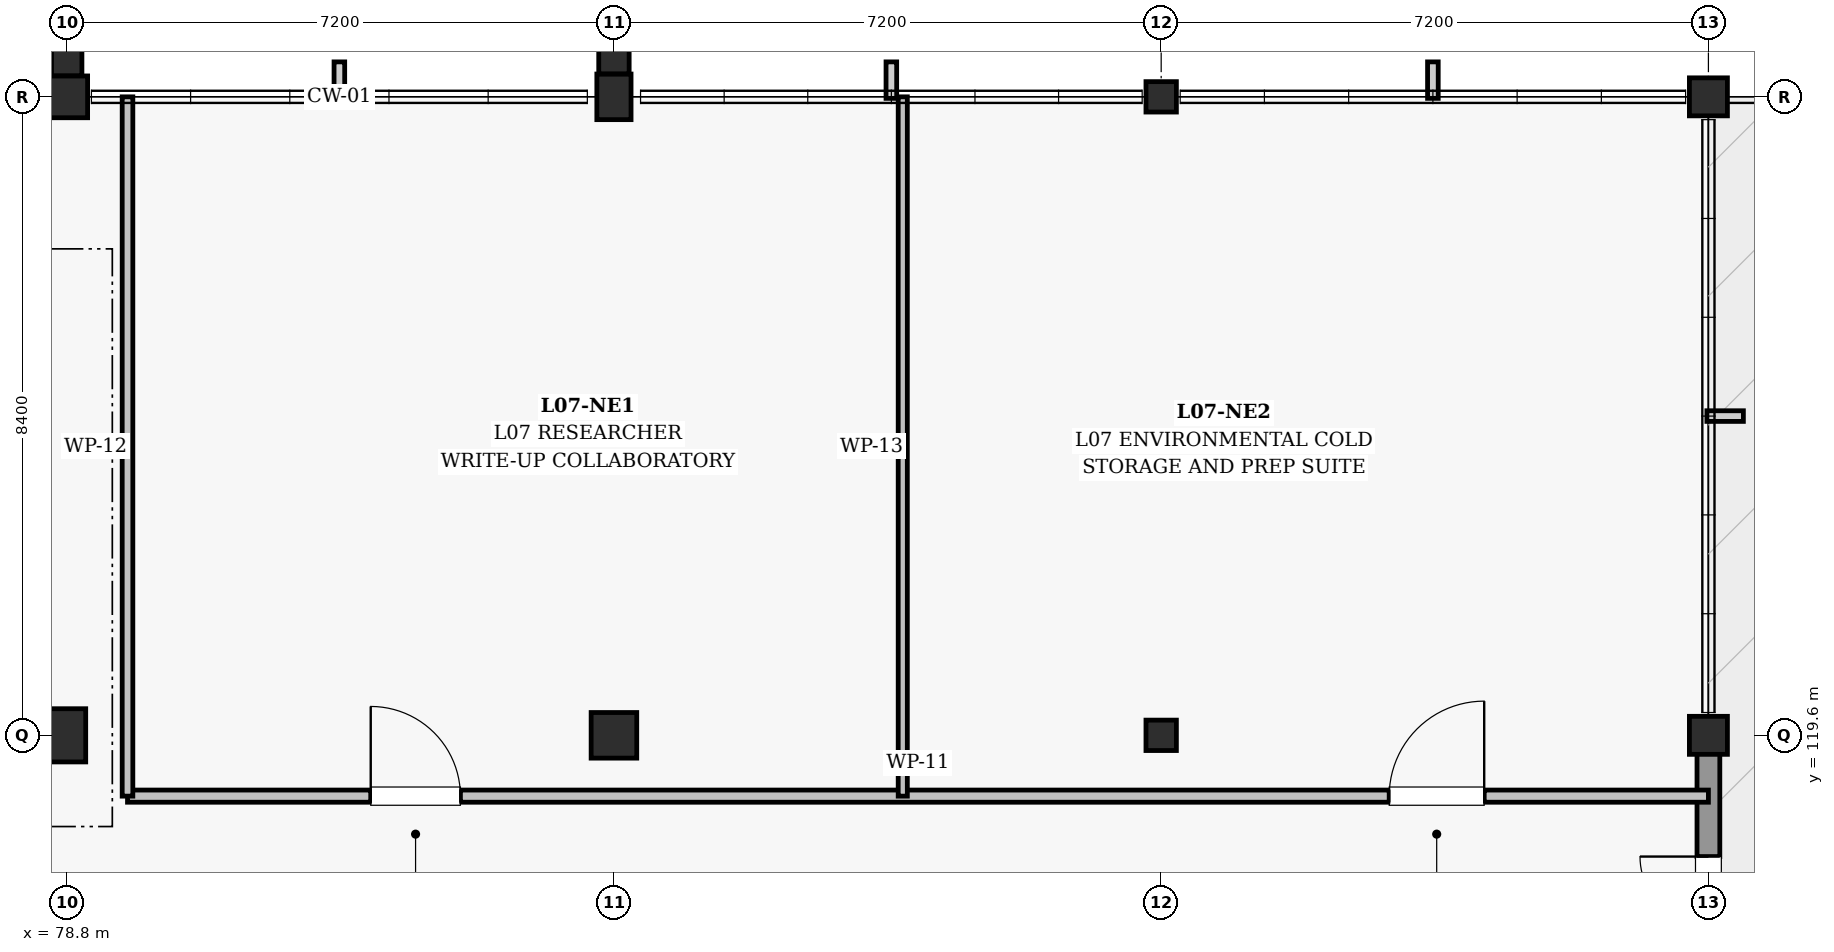
"""IFC4 building model, lengths in metres.
Left out: names, types, materials, properties, quantities, classifications, styles, units other than length and angle.
Written with IfcOpenShell. Run it as: python <this file> out.ifc"""

import sys

from ifc_helpers import new_model, si_unit, direction, frame, frame_2d, origin, origin_2d, place, context, subcontext, project, spatial, rectangle, extrude, element, fill, save


model = new_model("IFC4")
c1 = context("Model", 3, precision=1e-05, world=origin(), true_north=direction((0.0, 1.0)))
c2 = subcontext(c1, "Body", "Model", "MODEL_VIEW")
j1 = project(units=[si_unit("LENGTHUNIT", "METRE"), si_unit("PLANEANGLEUNIT", "RADIAN")], contexts=[c1])
p1 = place(None, origin())
s1 = spatial("IfcSite", under=j1, at=p1, CompositionType="ELEMENT")
p2 = place(p1, origin())
s2 = spatial("IfcBuilding", under=s1, at=p2, CompositionType="ELEMENT")
p3 = place(p2, frame((0.0, 0.0, 32.4)))
s3 = spatial("IfcBuildingStorey", under=s2, at=p3, CompositionType="ELEMENT", Elevation=32.4)
p4 = place(p3, frame((78.8, 119.6, 0.0), z_axis=(0.0, 0.0, 1.0), x_axis=(1.0, 0.0, 0.0)))
e1 = element("IfcColumn", 1, at=p4, inside=s3, PredefinedType="COLUMN", context=c2, shape_type="SweptSolid", body=[
    extrude(rectangle(XDim=0.5, YDim=0.7, at=origin_2d()), origin(), (0.0, 0.0, 1.0), 4.5),
])
p5 = place(p3, frame((78.8, 128.0, 0.0), z_axis=(0.0, 0.0, 1.0), x_axis=(1.0, 0.0, 0.0)))
e2 = element("IfcColumn", 2, at=p5, inside=s3, PredefinedType="COLUMN", context=c2, shape_type="SweptSolid", body=[
    extrude(rectangle(XDim=0.55, YDim=0.55, at=origin_2d()), origin(), (0.0, 0.0, 1.0), 4.5),
])
p6 = place(p3, frame((86.0, 119.6, 0.0), z_axis=(0.0, 0.0, 1.0), x_axis=(1.0, 0.0, 0.0)))
e3 = element("IfcColumn", 3, at=p6, inside=s3, PredefinedType="COLUMN", context=c2, shape_type="SweptSolid", body=[
    extrude(rectangle(XDim=0.6, YDim=0.6, at=origin_2d()), origin(), (0.0, 0.0, 1.0), 4.5),
])
p7 = place(p3, frame((86.0, 128.0, 0.0), z_axis=(0.0, 0.0, 1.0), x_axis=(1.0, 0.0, 0.0)))
e4 = element("IfcColumn", 4, at=p7, inside=s3, PredefinedType="COLUMN", context=c2, shape_type="SweptSolid", body=[
    extrude(rectangle(XDim=0.45, YDim=0.6, at=origin_2d()), origin(), (0.0, 0.0, 1.0), 4.5),
])
for number, where, z_axis, x_axis in (
    (5, (93.2, 119.6, 0.0), (0.0, 0.0, 1.0), (1.0, 0.0, 0.0)),
    (6, (93.2, 128.0, 0.0), (0.0, 0.0, 1.0), (1.0, 0.0, 0.0)),
):
    element("IfcColumn", number, at=place(p3, frame(where, z_axis=z_axis, x_axis=x_axis)), inside=s3, PredefinedType="COLUMN", context=c2, shape_type="SweptSolid", body=[
        extrude(rectangle(XDim=0.4, YDim=0.4, at=origin_2d()), origin(), (0.0, 0.0, 1.0), 4.5),
    ])
for number, where, z_axis, x_axis in (
    (7, (100.4, 119.6, 0.0), (0.0, 0.0, 1.0), (1.0, 0.0, 0.0)),
    (8, (100.4, 128.0, 0.0), (0.0, 0.0, 1.0), (1.0, 0.0, 0.0)),
):
    element("IfcColumn", number, at=place(p3, frame(where, z_axis=z_axis, x_axis=x_axis)), inside=s3, PredefinedType="COLUMN", context=c2, shape_type="SweptSolid", body=[
        extrude(rectangle(XDim=0.5, YDim=0.5, at=origin_2d()), origin(), (0.0, 0.0, 1.0), 4.5),
    ])
for number, where, z_axis, x_axis in (
    (9, (78.8, 128.578, 0.0), (0.0, 0.0, 1.0), (1.0, 0.0, 0.0)),
    (10, (86.0, 128.603, 0.0), (0.0, 0.0, 1.0), (1.0, 0.0, 0.0)),
):
    element("IfcColumn", number, at=place(p3, frame(where, z_axis=z_axis, x_axis=x_axis)), inside=s3, PredefinedType="PILASTER", context=c2, shape_type="SweptSolid", body=[
        extrude(rectangle(XDim=0.4, YDim=0.6, at=origin_2d()), origin(), (0.0, 0.0, 1.0), 4.5),
    ])
p8 = place(p3, frame((100.4, 111.405, 0.0), z_axis=(0.0, 0.0, 1.0), x_axis=(0.0, 1.0, 0.0)))
e11 = element("IfcWall", 11, at=p8, inside=s3, PredefinedType="SOLIDWALL", context=c2, shape_type="SweptSolid", body=[
    extrude(rectangle(XDim=7.965, YDim=0.3, at=frame_2d((3.982, 0.0))), origin(), (0.0, 0.0, 1.0), 3.355),
])
p9 = place(p8, frame((4.8, 0.0, 0.0)))
e12 = element("IfcOpeningElement", 12, at=p9, cuts=e11, PredefinedType="OPENING", context=c2, shape_type="SweptSolid", body=[
    extrude(rectangle(XDim=1.8, YDim=2.3, at=frame_2d((0.9, 1.15))), frame((0.0, 0.16, 0.0), z_axis=(0.0, -1.0, 0.0), x_axis=(1.0, 0.0, 0.0)), (0.0, 0.0, 1.0), 0.32),
])
p10 = place(p3, frame((79.6, 118.8, 0.0), z_axis=(0.0, 0.0, 1.0), x_axis=(1.0, 0.0, 0.0)))
e13 = element("IfcWall", 13, at=p10, inside=s3, PredefinedType="PARTITIONING", context=c2, shape_type="SweptSolid", body=[
    extrude(rectangle(XDim=20.8, YDim=0.16, at=frame_2d((10.4, 0.0))), origin(), (0.0, 0.0, 1.0), 3.31),
])
p11 = place(p10, frame((3.2, 0.0, 0.0)))
e14 = element("IfcOpeningElement", 14, at=p11, cuts=e13, PredefinedType="OPENING", context=c2, shape_type="SweptSolid", body=[
    extrude(rectangle(XDim=1.18, YDim=2.2, at=frame_2d((0.59, 1.1))), frame((0.0, 0.09, 0.0), z_axis=(0.0, -1.0, 0.0), x_axis=(1.0, 0.0, 0.0)), (0.0, 0.0, 1.0), 0.18),
])
p12 = place(p10, frame((16.6, 0.0, 0.0)))
e15 = element("IfcOpeningElement", 15, at=p12, cuts=e13, PredefinedType="OPENING", context=c2, shape_type="SweptSolid", body=[
    extrude(rectangle(XDim=1.25, YDim=2.2, at=frame_2d((0.625, 1.1))), frame((0.0, 0.09, 0.0), z_axis=(0.0, -1.0, 0.0), x_axis=(1.0, 0.0, 0.0)), (0.0, 0.0, 1.0), 0.18),
])
p13 = place(p3, frame((79.6, 118.8, 0.0), z_axis=(0.0, 0.0, 1.0), x_axis=(0.0, 1.0, 0.0)))
e16 = element("IfcWall", 16, at=p13, inside=s3, PredefinedType="PARTITIONING", context=c2, shape_type="SweptSolid", body=[
    extrude(rectangle(XDim=9.2, YDim=0.14, at=frame_2d((4.6, 0.0))), origin(), (0.0, 0.0, 1.0), 3.51),
])
p14 = place(p3, frame((89.8, 118.8, 0.0), z_axis=(0.0, 0.0, 1.0), x_axis=(0.0, 1.0, 0.0)))
e17 = element("IfcWall", 17, at=p14, inside=s3, PredefinedType="PARTITIONING", context=c2, shape_type="SweptSolid", body=[
    extrude(rectangle(XDim=9.2, YDim=0.12, at=frame_2d((4.6, 0.0))), origin(), (0.0, 0.0, 1.0), 3.41),
])
p15 = place(p9, origin())
e18 = element("IfcDoor", 18, at=p15, inside=s3, OperationType="DOUBLE_DOOR_SINGLE_SWING", PredefinedType="DOOR", context=c2, shape_type="SweptSolid", body=[
    extrude(rectangle(XDim=1.8, YDim=2.3, at=frame_2d((0.9, 1.15))), frame((0.0, 0.025, 0.0), z_axis=(0.0, -1.0, 0.0), x_axis=(1.0, 0.0, 0.0)), (0.0, 0.0, 1.0), 0.05),
])
fill(e12, e18)
p16 = place(p11, origin())
e19 = element("IfcDoor", 19, at=p16, inside=s3, OperationType="SINGLE_SWING_LEFT", PredefinedType="DOOR", context=c2, shape_type="SweptSolid", body=[
    extrude(rectangle(XDim=1.18, YDim=2.2, at=frame_2d((0.59, 1.1))), frame((0.0, 0.025, 0.0), z_axis=(0.0, -1.0, 0.0), x_axis=(1.0, 0.0, 0.0)), (0.0, 0.0, 1.0), 0.05),
])
fill(e14, e19)
p17 = place(p12, origin())
e20 = element("IfcDoor", 20, at=p17, inside=s3, OperationType="SINGLE_SWING_RIGHT", PredefinedType="DOOR", context=c2, shape_type="SweptSolid", body=[
    extrude(rectangle(XDim=1.25, YDim=2.2, at=frame_2d((0.625, 1.1))), frame((0.0, 0.025, 0.0), z_axis=(0.0, -1.0, 0.0), x_axis=(1.0, 0.0, 0.0)), (0.0, 0.0, 1.0), 0.05),
])
fill(e15, e20)
save(model, sys.argv[1])
